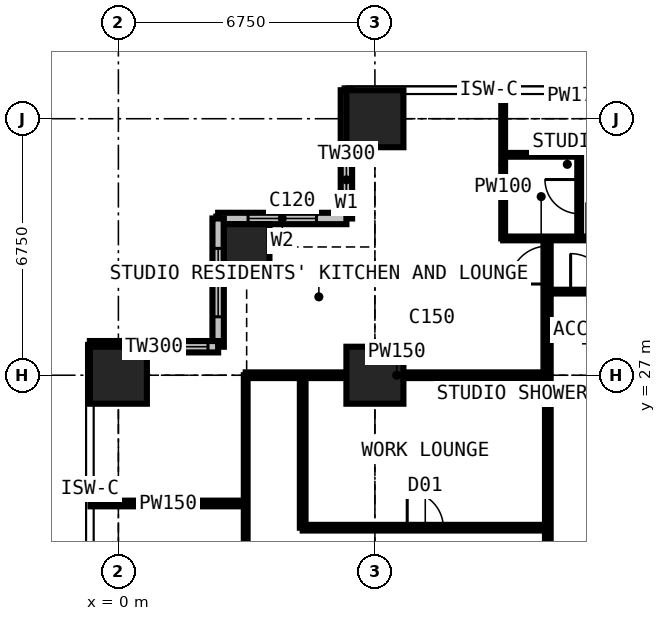
"""IFC4 building model, lengths in metres.
Left out: names, types, materials, properties, quantities, classifications, styles, units other than length and angle.
Written with IfcOpenShell. Run it as: python <this file> out.ifc"""

import sys

from ifc_helpers import new_model, si_unit, direction, frame, frame_2d, origin, origin_2d, place, context, subcontext, project, spatial, rectangle, extrude, element, fill, save


model = new_model("IFC4")
c1 = context("Model", 3, precision=1e-05, world=origin(), true_north=direction((0.0, 1.0)))
c2 = subcontext(c1, "Body", "Model", "MODEL_VIEW")
j1 = project(units=[si_unit("LENGTHUNIT", "METRE"), si_unit("PLANEANGLEUNIT", "RADIAN")], contexts=[c1])
p1 = place(None, origin())
s1 = spatial("IfcSite", under=j1, at=p1, CompositionType="ELEMENT")
p2 = place(p1, origin())
s2 = spatial("IfcBuilding", under=s1, at=p2, CompositionType="ELEMENT")
p3 = place(p2, frame((0.0, 0.0, 163.8)))
s3 = spatial("IfcBuildingStorey", under=s2, at=p3, CompositionType="ELEMENT", Elevation=163.8)
p4 = place(p3, frame((0.0, 27.0, 0.0), z_axis=(0.0, 0.0, 1.0), x_axis=(1.0, 0.0, 0.0)))
e1 = element("IfcColumn", 1, at=p4, inside=s3, PredefinedType="COLUMN", context=c2, shape_type="SweptSolid", body=[
    extrude(rectangle(XDim=1.5, YDim=1.5, at=origin_2d()), origin(), (0.0, 0.0, 1.0), 3.6),
])
p5 = place(p3, frame((3.375, 30.375, 0.0), z_axis=(0.0, 0.0, 1.0), x_axis=(1.0, 0.0, 0.0)))
e2 = element("IfcColumn", 2, at=p5, inside=s3, PredefinedType="COLUMN", context=c2, shape_type="SweptSolid", body=[
    extrude(rectangle(XDim=1.2, YDim=1.2, at=origin_2d()), origin(), (0.0, 0.0, 1.0), 3.6),
])
for number, where, z_axis, x_axis in (
    (3, (6.75, 27.0, 0.0), (0.0, 0.0, 1.0), (1.0, 0.0, 0.0)),
    (4, (6.75, 33.75, 0.0), (0.0, 0.0, 1.0), (1.0, 0.0, 0.0)),
):
    element("IfcColumn", number, at=place(p3, frame(where, z_axis=z_axis, x_axis=x_axis)), inside=s3, PredefinedType="COLUMN", context=c2, shape_type="SweptSolid", body=[
        extrude(rectangle(XDim=1.5, YDim=1.5, at=origin_2d()), origin(), (0.0, 0.0, 1.0), 3.6),
    ])
p6 = place(p3, frame((6.0, 34.5, 0.0), z_axis=(0.0, 0.0, 1.0), x_axis=(0.0, -1.0, 0.0)))
e5 = element("IfcWall", 5, at=p6, inside=s3, PredefinedType="SOLIDWALL", context=c2, shape_type="SweptSolid", body=[
    extrude(rectangle(XDim=3.375, YDim=0.3, at=frame_2d((1.688, 0.0))), origin(), (0.0, 0.0, 1.0), 3.375),
])
p7 = place(p6, frame((1.607, 0.0, 0.9)))
e6 = element("IfcOpeningElement", 6, at=p7, cuts=e5, PredefinedType="OPENING", context=c2, shape_type="SweptSolid", body=[
    extrude(rectangle(XDim=1.5, YDim=1.8, at=frame_2d((0.75, 0.9))), frame((0.0, 0.16, 0.0), z_axis=(0.0, -1.0, 0.0), x_axis=(1.0, 0.0, 0.0)), (0.0, 0.0, 1.0), 0.32),
])
p8 = place(p3, frame((6.0, 31.125, 0.0), z_axis=(0.0, 0.0, 1.0), x_axis=(-1.0, 0.0, 0.0)))
e7 = element("IfcWall", 7, at=p8, inside=s3, PredefinedType="SOLIDWALL", context=c2, shape_type="SweptSolid", body=[
    extrude(rectangle(XDim=3.375, YDim=0.3, at=frame_2d((1.688, 0.0))), origin(), (0.0, 0.0, 1.0), 3.375),
])
p9 = place(p8, frame((0.788, 0.0, 0.6)))
e8 = element("IfcOpeningElement", 8, at=p9, cuts=e7, PredefinedType="OPENING", context=c2, shape_type="SweptSolid", body=[
    extrude(rectangle(XDim=1.8, YDim=2.1, at=frame_2d((0.9, 1.05))), frame((0.0, 0.16, 0.0), z_axis=(0.0, -1.0, 0.0), x_axis=(1.0, 0.0, 0.0)), (0.0, 0.0, 1.0), 0.32),
])
p10 = place(p3, frame((2.625, 31.125, 0.0), z_axis=(0.0, 0.0, 1.0), x_axis=(0.0, -1.0, 0.0)))
e9 = element("IfcWall", 9, at=p10, inside=s3, PredefinedType="SOLIDWALL", context=c2, shape_type="SweptSolid", body=[
    extrude(rectangle(XDim=3.375, YDim=0.3, at=frame_2d((1.688, 0.0))), origin(), (0.0, 0.0, 1.0), 3.375),
])
p11 = place(p10, frame((0.788, 0.0, 0.6)))
e10 = element("IfcOpeningElement", 10, at=p11, cuts=e9, PredefinedType="OPENING", context=c2, shape_type="SweptSolid", body=[
    extrude(rectangle(XDim=1.8, YDim=2.1, at=frame_2d((0.9, 1.05))), frame((0.0, 0.16, 0.0), z_axis=(0.0, -1.0, 0.0), x_axis=(1.0, 0.0, 0.0)), (0.0, 0.0, 1.0), 0.32),
])
p12 = place(p3, frame((2.625, 27.75, 0.0), z_axis=(0.0, 0.0, 1.0), x_axis=(-1.0, 0.0, 0.0)))
e11 = element("IfcWall", 11, at=p12, inside=s3, PredefinedType="SOLIDWALL", context=c2, shape_type="SweptSolid", body=[
    extrude(rectangle(XDim=3.375, YDim=0.3, at=frame_2d((1.688, 0.0))), origin(), (0.0, 0.0, 1.0), 3.375),
])
p13 = place(p12, frame((0.268, 0.0, 0.9)))
e12 = element("IfcOpeningElement", 12, at=p13, cuts=e11, PredefinedType="OPENING", context=c2, shape_type="SweptSolid", body=[
    extrude(rectangle(XDim=1.5, YDim=1.8, at=frame_2d((0.75, 0.9))), frame((0.0, 0.16, 0.0), z_axis=(0.0, -1.0, 0.0), x_axis=(1.0, 0.0, 0.0)), (0.0, 0.0, 1.0), 0.32),
])
p14 = place(p3, frame((-0.734, 23.625, 0.0), z_axis=(0.0, 0.0, 1.0), x_axis=(1.0, 0.0, 0.0)))
e13 = element("IfcWall", 13, at=p14, inside=s3, PredefinedType="PARTITIONING", context=c2, shape_type="SweptSolid", body=[
    extrude(rectangle(XDim=4.084, YDim=0.15, at=frame_2d((2.042, 0.0))), origin(), (0.0, 0.0, 1.0), 3.375),
])
p15 = place(p3, frame((3.35, 10.125, 0.0), z_axis=(0.0, 0.0, 1.0), x_axis=(0.0, 1.0, 0.0)))
e14 = element("IfcWall", 14, at=p15, inside=s3, PredefinedType="PARTITIONING", context=c2, shape_type="SweptSolid", body=[
    extrude(rectangle(XDim=16.875, YDim=0.1, at=frame_2d((8.438, 0.0))), origin(), (0.0, 0.0, 1.0), 3.375),
])
p16 = place(p15, frame((4.2, 0.0, 0.0)))
e15 = element("IfcOpeningElement", 15, at=p16, cuts=e14, PredefinedType="OPENING", context=c2, shape_type="SweptSolid", body=[
    extrude(rectangle(XDim=0.95, YDim=2.2, at=frame_2d((0.475, 1.1))), frame((0.0, 0.06, 0.0), z_axis=(0.0, -1.0, 0.0), x_axis=(1.0, 0.0, 0.0)), (0.0, 0.0, 1.0), 0.12),
])
p17 = place(p15, frame((10.95, 0.0, 0.0)))
e16 = element("IfcOpeningElement", 16, at=p17, cuts=e14, PredefinedType="OPENING", context=c2, shape_type="SweptSolid", body=[
    extrude(rectangle(XDim=0.95, YDim=2.2, at=frame_2d((0.475, 1.1))), frame((0.0, 0.06, 0.0), z_axis=(0.0, -1.0, 0.0), x_axis=(1.0, 0.0, 0.0)), (0.0, 0.0, 1.0), 0.12),
])
p18 = place(p3, frame((3.35, 27.0, 0.0), z_axis=(0.0, 0.0, 1.0), x_axis=(1.0, 0.0, 0.0)))
e17 = element("IfcWall", 17, at=p18, inside=s3, PredefinedType="PARTITIONING", context=c2, shape_type="SweptSolid", body=[
    extrude(rectangle(XDim=7.95, YDim=0.15, at=frame_2d((3.975, 0.0))), origin(), (0.0, 0.0, 1.0), 2.806),
])
p19 = place(p3, frame((4.85, 22.988, 0.0), z_axis=(0.0, 0.0, 1.0), x_axis=(0.0, 1.0, 0.0)))
e18 = element("IfcWall", 18, at=p19, inside=s3, PredefinedType="PARTITIONING", context=c2, shape_type="SweptSolid", body=[
    extrude(rectangle(XDim=4.012, YDim=0.15, at=frame_2d((2.006, 0.0))), origin(), (0.0, 0.0, 1.0), 3.375),
])
p20 = place(p3, frame((4.85, 22.988, 0.0), z_axis=(0.0, 0.0, 1.0), x_axis=(1.0, 0.0, 0.0)))
e19 = element("IfcWall", 19, at=p20, inside=s3, PredefinedType="PARTITIONING", context=c2, shape_type="SweptSolid", body=[
    extrude(rectangle(XDim=6.45, YDim=0.15, at=frame_2d((3.225, 0.0))), origin(), (0.0, 0.0, 1.0), 3.375),
])
p21 = place(p20, frame((2.75, 0.0, 0.0)))
e20 = element("IfcOpeningElement", 20, at=p21, cuts=e19, PredefinedType="OPENING", context=c2, shape_type="SweptSolid", body=[
    extrude(rectangle(XDim=0.95, YDim=2.2, at=frame_2d((0.475, 1.1))), frame((0.0, 0.085, 0.0), z_axis=(0.0, -1.0, 0.0), x_axis=(1.0, 0.0, 0.0)), (0.0, 0.0, 1.0), 0.17),
])
p22 = place(p3, frame((10.125, 30.6, 0.0), z_axis=(0.0, 0.0, 1.0), x_axis=(0.0, 1.0, 0.0)))
e21 = element("IfcWall", 21, at=p22, inside=s3, PredefinedType="PARTITIONING", context=c2, shape_type="SweptSolid", body=[
    extrude(rectangle(XDim=3.884, YDim=0.1, at=frame_2d((1.942, 0.0))), origin(), (0.0, 0.0, 1.0), 3.375),
])
p23 = place(p3, frame((10.125, 30.6, 0.0), z_axis=(0.0, 0.0, 1.0), x_axis=(1.0, 0.0, 0.0)))
e22 = element("IfcWall", 22, at=p23, inside=s3, PredefinedType="PARTITIONING", context=c2, shape_type="SweptSolid", body=[
    extrude(rectangle(XDim=3.375, YDim=0.1, at=frame_2d((1.688, 0.0))), origin(), (0.0, 0.0, 1.0), 3.375),
])
p24 = place(p23, frame((2.2, 0.0, 0.0)))
e23 = element("IfcOpeningElement", 23, at=p24, cuts=e22, PredefinedType="OPENING", context=c2, shape_type="SweptSolid", body=[
    extrude(rectangle(XDim=0.95, YDim=2.2, at=frame_2d((0.475, 1.1))), frame((0.0, 0.06, 0.0), z_axis=(0.0, -1.0, 0.0), x_axis=(1.0, 0.0, 0.0)), (0.0, 0.0, 1.0), 0.12),
])
p25 = place(p3, frame((10.125, 32.8, 0.0), z_axis=(0.0, 0.0, 1.0), x_axis=(1.0, 0.0, 0.0)))
e24 = element("IfcWall", 24, at=p25, inside=s3, PredefinedType="PARTITIONING", context=c2, shape_type="SweptSolid", body=[
    extrude(rectangle(XDim=2.0, YDim=0.1, at=frame_2d((1.0, 0.0))), origin(), (0.0, 0.0, 1.0), 3.375),
])
p26 = place(p3, frame((11.3, 11.3, 0.0), z_axis=(0.0, 0.0, 1.0), x_axis=(0.0, 1.0, 0.0)))
e25 = element("IfcWall", 25, at=p26, inside=s3, PredefinedType="PARTITIONING", context=c2, shape_type="SweptSolid", body=[
    extrude(rectangle(XDim=19.3, YDim=0.15, at=frame_2d((9.65, 0.0))), origin(), (0.0, 0.0, 1.0), 3.375),
])
p27 = place(p26, frame((18.1, 0.0, 0.0)))
e26 = element("IfcOpeningElement", 26, at=p27, cuts=e25, PredefinedType="OPENING", context=c2, shape_type="SweptSolid", body=[
    extrude(rectangle(XDim=1.0, YDim=2.2, at=frame_2d((0.5, 1.1))), frame((0.0, 0.085, 0.0), z_axis=(0.0, -1.0, 0.0), x_axis=(1.0, 0.0, 0.0)), (0.0, 0.0, 1.0), 0.17),
])
p28 = place(p26, frame((10.137, 0.0, 0.0)))
e27 = element("IfcOpeningElement", 27, at=p28, cuts=e25, PredefinedType="OPENING", context=c2, shape_type="SweptSolid", body=[
    extrude(rectangle(XDim=1.0, YDim=2.2, at=frame_2d((0.5, 1.1))), frame((0.0, 0.085, 0.0), z_axis=(0.0, -1.0, 0.0), x_axis=(1.0, 0.0, 0.0)), (0.0, 0.0, 1.0), 0.17),
])
p29 = place(p3, frame((11.3, 29.2, 0.0), z_axis=(0.0, 0.0, 1.0), x_axis=(1.0, 0.0, 0.0)))
e28 = element("IfcWall", 28, at=p29, inside=s3, PredefinedType="PARTITIONING", context=c2, shape_type="SweptSolid", body=[
    extrude(rectangle(XDim=19.809, YDim=0.1, at=frame_2d((9.904, 0.0))), origin(), (0.0, 0.0, 1.0), 3.375),
])
p30 = place(p29, frame((16.3, 0.0, 0.0)))
e29 = element("IfcOpeningElement", 29, at=p30, cuts=e28, PredefinedType="OPENING", context=c2, shape_type="SweptSolid", body=[
    extrude(rectangle(XDim=1.0, YDim=2.2, at=frame_2d((0.5, 1.1))), frame((0.0, 0.06, 0.0), z_axis=(0.0, -1.0, 0.0), x_axis=(1.0, 0.0, 0.0)), (0.0, 0.0, 1.0), 0.12),
])
p31 = place(p29, frame((6.4, 0.0, 0.0)))
e30 = element("IfcOpeningElement", 30, at=p31, cuts=e28, PredefinedType="OPENING", context=c2, shape_type="SweptSolid", body=[
    extrude(rectangle(XDim=0.95, YDim=2.2, at=frame_2d((0.475, 1.1))), frame((0.0, 0.06, 0.0), z_axis=(0.0, -1.0, 0.0), x_axis=(1.0, 0.0, 0.0)), (0.0, 0.0, 1.0), 0.12),
])
p32 = place(p29, frame((13.15, 0.0, 0.0)))
e31 = element("IfcOpeningElement", 31, at=p32, cuts=e28, PredefinedType="OPENING", context=c2, shape_type="SweptSolid", body=[
    extrude(rectangle(XDim=0.95, YDim=2.2, at=frame_2d((0.475, 1.1))), frame((0.0, 0.06, 0.0), z_axis=(0.0, -1.0, 0.0), x_axis=(1.0, 0.0, 0.0)), (0.0, 0.0, 1.0), 0.12),
])
p33 = place(p29, frame((0.6, 0.0, 0.0)))
e32 = element("IfcOpeningElement", 32, at=p33, cuts=e28, PredefinedType="OPENING", context=c2, shape_type="SweptSolid", body=[
    extrude(rectangle(XDim=1.0, YDim=2.2, at=frame_2d((0.5, 1.1))), frame((0.0, 0.06, 0.0), z_axis=(0.0, -1.0, 0.0), x_axis=(1.0, 0.0, 0.0)), (0.0, 0.0, 1.0), 0.12),
])
p34 = place(p3, frame((12.125, 30.6, 0.0), z_axis=(0.0, 0.0, 1.0), x_axis=(0.0, 1.0, 0.0)))
e33 = element("IfcWall", 33, at=p34, inside=s3, PredefinedType="PARTITIONING", context=c2, shape_type="SweptSolid", body=[
    extrude(rectangle(XDim=2.2, YDim=0.1, at=frame_2d((1.1, 0.0))), origin(), (0.0, 0.0, 1.0), 3.375),
])
p35 = place(p34, frame((0.65, 0.0, 0.0)))
e34 = element("IfcOpeningElement", 34, at=p35, cuts=e33, PredefinedType="OPENING", context=c2, shape_type="SweptSolid", body=[
    extrude(rectangle(XDim=0.9, YDim=2.2, at=frame_2d((0.45, 1.1))), frame((0.0, 0.06, 0.0), z_axis=(0.0, -1.0, 0.0), x_axis=(1.0, 0.0, 0.0)), (0.0, 0.0, 1.0), 0.12),
])
p36 = place(p7, origin())
e35 = element("IfcWindow", 35, at=p36, inside=s3, PartitioningType="SINGLE_PANEL", PredefinedType="WINDOW", context=c2, shape_type="SweptSolid", body=[
    extrude(rectangle(XDim=1.5, YDim=1.8, at=frame_2d((0.75, 0.9))), frame((0.0, 0.03, 0.0), z_axis=(0.0, -1.0, 0.0), x_axis=(1.0, 0.0, 0.0)), (0.0, 0.0, 1.0), 0.06),
])
fill(e6, e35)
p37 = place(p9, origin())
e36 = element("IfcWindow", 36, at=p37, inside=s3, PartitioningType="SINGLE_PANEL", PredefinedType="WINDOW", context=c2, shape_type="SweptSolid", body=[
    extrude(rectangle(XDim=1.8, YDim=2.1, at=frame_2d((0.9, 1.05))), frame((0.0, 0.03, 0.0), z_axis=(0.0, -1.0, 0.0), x_axis=(1.0, 0.0, 0.0)), (0.0, 0.0, 1.0), 0.06),
])
fill(e8, e36)
p38 = place(p11, origin())
e37 = element("IfcWindow", 37, at=p38, inside=s3, PartitioningType="SINGLE_PANEL", PredefinedType="WINDOW", context=c2, shape_type="SweptSolid", body=[
    extrude(rectangle(XDim=1.8, YDim=2.1, at=frame_2d((0.9, 1.05))), frame((0.0, 0.03, 0.0), z_axis=(0.0, -1.0, 0.0), x_axis=(1.0, 0.0, 0.0)), (0.0, 0.0, 1.0), 0.06),
])
fill(e10, e37)
p39 = place(p13, origin())
e38 = element("IfcWindow", 38, at=p39, inside=s3, PartitioningType="SINGLE_PANEL", PredefinedType="WINDOW", context=c2, shape_type="SweptSolid", body=[
    extrude(rectangle(XDim=1.5, YDim=1.8, at=frame_2d((0.75, 0.9))), frame((0.0, 0.03, 0.0), z_axis=(0.0, -1.0, 0.0), x_axis=(1.0, 0.0, 0.0)), (0.0, 0.0, 1.0), 0.06),
])
fill(e12, e38)
p40 = place(p35, origin())
e39 = element("IfcDoor", 39, at=p40, inside=s3, OperationType="SINGLE_SWING_RIGHT", PredefinedType="DOOR", context=c2, shape_type="SweptSolid", body=[
    extrude(rectangle(XDim=0.9, YDim=2.2, at=frame_2d((0.45, 1.1))), frame((0.0, 0.025, 0.0), z_axis=(0.0, -1.0, 0.0), x_axis=(1.0, 0.0, 0.0)), (0.0, 0.0, 1.0), 0.05),
])
fill(e34, e39)
p41 = place(p33, origin())
e40 = element("IfcDoor", 40, at=p41, inside=s3, OperationType="SINGLE_SWING_LEFT", PredefinedType="DOOR", context=c2, shape_type="SweptSolid", body=[
    extrude(rectangle(XDim=1.0, YDim=2.2, at=frame_2d((0.5, 1.1))), frame((0.0, 0.025, 0.0), z_axis=(0.0, -1.0, 0.0), x_axis=(1.0, 0.0, 0.0)), (0.0, 0.0, 1.0), 0.05),
])
fill(e32, e40)
p42 = place(p27, origin())
e41 = element("IfcDoor", 41, at=p42, inside=s3, OperationType="SINGLE_SWING_LEFT", PredefinedType="DOOR", context=c2, shape_type="SweptSolid", body=[
    extrude(rectangle(XDim=1.0, YDim=2.2, at=frame_2d((0.5, 1.1))), frame((0.0, 0.025, 0.0), z_axis=(0.0, -1.0, 0.0), x_axis=(1.0, 0.0, 0.0)), (0.0, 0.0, 1.0), 0.05),
])
fill(e26, e41)
p43 = place(p21, origin())
e42 = element("IfcDoor", 42, at=p43, inside=s3, OperationType="SINGLE_SWING_LEFT", PredefinedType="DOOR", context=c2, shape_type="SweptSolid", body=[
    extrude(rectangle(XDim=0.95, YDim=2.2, at=frame_2d((0.475, 1.1))), frame((0.0, 0.025, 0.0), z_axis=(0.0, -1.0, 0.0), x_axis=(1.0, 0.0, 0.0)), (0.0, 0.0, 1.0), 0.05),
])
fill(e20, e42)
save(model, sys.argv[1])
